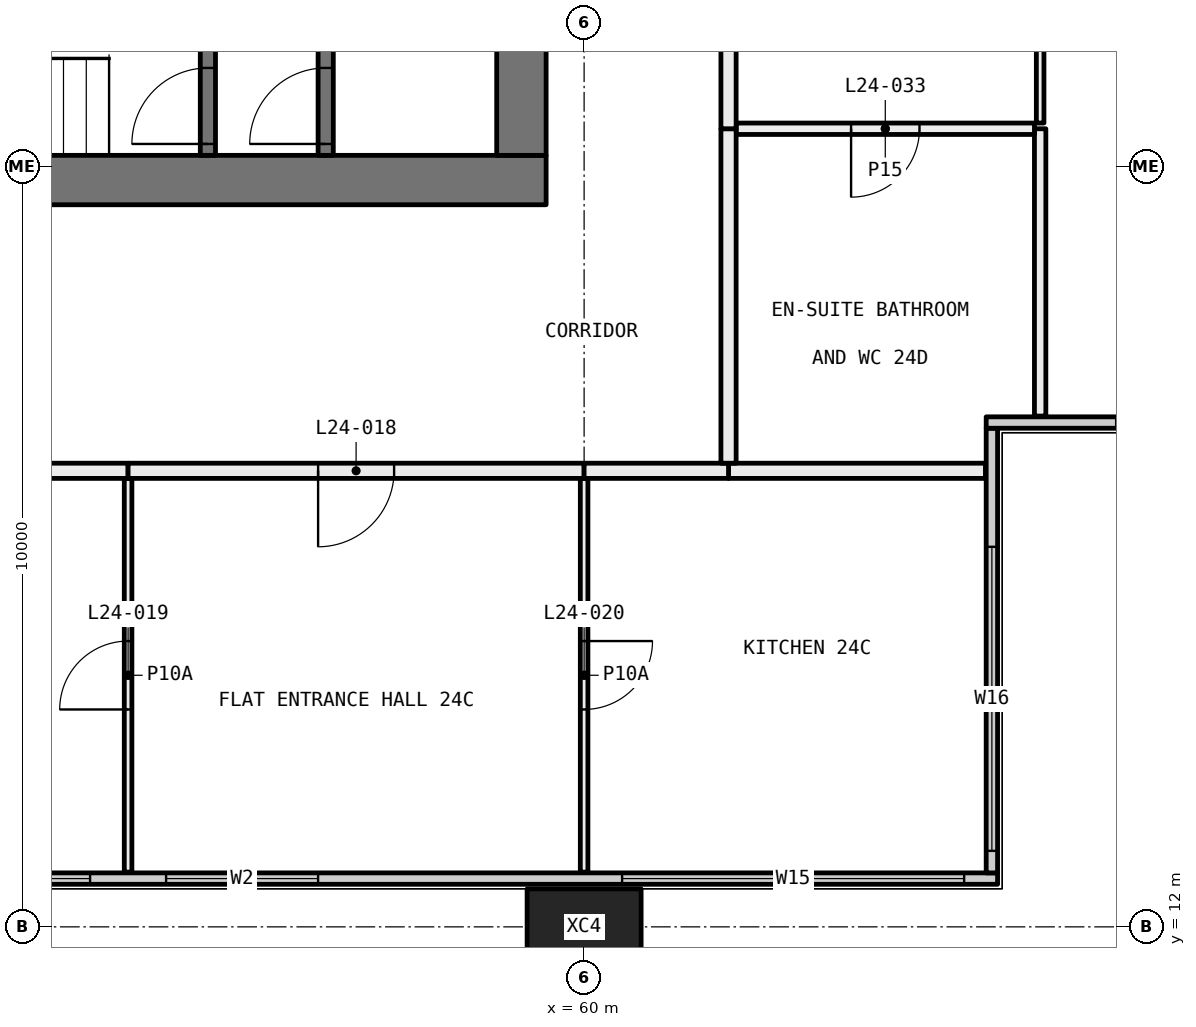
"""IFC4 building model, lengths in metres.
Left out: names, types, materials, properties, quantities, classifications, styles, units other than length and angle.
Written with IfcOpenShell. Run it as: python <this file> out.ifc"""

import sys

from ifc_helpers import new_model, si_unit, direction, frame, frame_2d, origin, origin_2d, place, context, subcontext, project, spatial, rectangle, hollow_rectangle, extrude, element, fill, save


model = new_model("IFC4")
c1 = context("Model", 3, precision=1e-05, world=origin(), true_north=direction((0.0, 1.0)))
c2 = subcontext(c1, "Body", "Model", "MODEL_VIEW")
j1 = project(units=[si_unit("LENGTHUNIT", "METRE"), si_unit("PLANEANGLEUNIT", "RADIAN")], contexts=[c1])
p1 = place(None, origin())
s1 = spatial("IfcSite", under=j1, at=p1, CompositionType="ELEMENT")
p2 = place(p1, origin())
s2 = spatial("IfcBuilding", under=s1, at=p2, CompositionType="ELEMENT")
p3 = place(p2, frame((0.0, 0.0, 96.6)))
s3 = spatial("IfcBuildingStorey", under=s2, at=p3, CompositionType="ELEMENT", Elevation=96.6)
p4 = place(p3, frame((60.0, 12.0, -0.4), z_axis=(0.0, 0.0, 1.0), x_axis=(1.0, 0.0, 0.0)))
e1 = element("IfcColumn", 1, at=p4, inside=s3, PredefinedType="COLUMN", context=c2, shape_type="SweptSolid", body=[
    extrude(hollow_rectangle(XDim=1.5, YDim=1.0, WallThickness=0.06, at=origin_2d()), origin(), (0.0, 0.0, 1.0), 3.45),
])
p5 = place(p3, frame((6.56, 12.635, 0.0), z_axis=(0.0, 0.0, 1.0), x_axis=(1.0, 0.0, 0.0)))
e2 = element("IfcWall", 2, at=p5, inside=s3, PredefinedType="ELEMENTEDWALL", context=c2, shape_type="SweptSolid", body=[
    extrude(rectangle(XDim=58.88, YDim=0.15, at=frame_2d((29.44, 0.0))), origin(), (0.0, 0.0, 1.0), 3.05),
])
p6 = place(p5, frame((0.44, 0.0, 0.45)))
e3 = element("IfcOpeningElement", 3, at=p6, cuts=e2, PredefinedType="OPENING", context=c2, shape_type="SweptSolid", body=[
    extrude(rectangle(XDim=4.5, YDim=2.55, at=frame_2d((2.25, 1.275))), frame((0.0, 0.085, 0.0), z_axis=(0.0, -1.0, 0.0), x_axis=(1.0, 0.0, 0.0)), (0.0, 0.0, 1.0), 0.17),
])
p7 = place(p5, frame((8.19, 0.0, 0.45)))
e4 = element("IfcOpeningElement", 4, at=p7, cuts=e2, PredefinedType="OPENING", context=c2, shape_type="SweptSolid", body=[
    extrude(rectangle(XDim=2.75, YDim=2.55, at=frame_2d((1.375, 1.275))), frame((0.0, 0.085, 0.0), z_axis=(0.0, -1.0, 0.0), x_axis=(1.0, 0.0, 0.0)), (0.0, 0.0, 1.0), 0.17),
])
p8 = place(p5, frame((11.94, 0.0, 0.45)))
e5 = element("IfcOpeningElement", 5, at=p8, cuts=e2, PredefinedType="OPENING", context=c2, shape_type="SweptSolid", body=[
    extrude(rectangle(XDim=2.75, YDim=2.55, at=frame_2d((1.375, 1.275))), frame((0.0, 0.085, 0.0), z_axis=(0.0, -1.0, 0.0), x_axis=(1.0, 0.0, 0.0)), (0.0, 0.0, 1.0), 0.17),
])
p9 = place(p5, frame((20.19, 0.0, 0.45)))
e6 = element("IfcOpeningElement", 6, at=p9, cuts=e2, PredefinedType="OPENING", context=c2, shape_type="SweptSolid", body=[
    extrude(rectangle(XDim=2.75, YDim=2.55, at=frame_2d((1.375, 1.275))), frame((0.0, 0.085, 0.0), z_axis=(0.0, -1.0, 0.0), x_axis=(1.0, 0.0, 0.0)), (0.0, 0.0, 1.0), 0.17),
])
p10 = place(p5, frame((23.94, 0.0, 0.45)))
e7 = element("IfcOpeningElement", 7, at=p10, cuts=e2, PredefinedType="OPENING", context=c2, shape_type="SweptSolid", body=[
    extrude(rectangle(XDim=2.0, YDim=2.55, at=frame_2d((1.0, 1.275))), frame((0.0, 0.085, 0.0), z_axis=(0.0, -1.0, 0.0), x_axis=(1.0, 0.0, 0.0)), (0.0, 0.0, 1.0), 0.17),
])
p11 = place(p5, frame((32.19, 0.0, 0.45)))
e8 = element("IfcOpeningElement", 8, at=p11, cuts=e2, PredefinedType="OPENING", context=c2, shape_type="SweptSolid", body=[
    extrude(rectangle(XDim=2.75, YDim=2.55, at=frame_2d((1.375, 1.275))), frame((0.0, 0.085, 0.0), z_axis=(0.0, -1.0, 0.0), x_axis=(1.0, 0.0, 0.0)), (0.0, 0.0, 1.0), 0.17),
])
p12 = place(p5, frame((35.94, 0.0, 0.45)))
e9 = element("IfcOpeningElement", 9, at=p12, cuts=e2, PredefinedType="OPENING", context=c2, shape_type="SweptSolid", body=[
    extrude(rectangle(XDim=2.75, YDim=2.55, at=frame_2d((1.375, 1.275))), frame((0.0, 0.085, 0.0), z_axis=(0.0, -1.0, 0.0), x_axis=(1.0, 0.0, 0.0)), (0.0, 0.0, 1.0), 0.17),
])
p13 = place(p5, frame((44.19, 0.0, 0.45)))
e10 = element("IfcOpeningElement", 10, at=p13, cuts=e2, PredefinedType="OPENING", context=c2, shape_type="SweptSolid", body=[
    extrude(rectangle(XDim=2.75, YDim=2.55, at=frame_2d((1.375, 1.275))), frame((0.0, 0.085, 0.0), z_axis=(0.0, -1.0, 0.0), x_axis=(1.0, 0.0, 0.0)), (0.0, 0.0, 1.0), 0.17),
])
p14 = place(p5, frame((47.94, 0.0, 0.45)))
e11 = element("IfcOpeningElement", 11, at=p14, cuts=e2, PredefinedType="OPENING", context=c2, shape_type="SweptSolid", body=[
    extrude(rectangle(XDim=2.0, YDim=2.55, at=frame_2d((1.0, 1.275))), frame((0.0, 0.085, 0.0), z_axis=(0.0, -1.0, 0.0), x_axis=(1.0, 0.0, 0.0)), (0.0, 0.0, 1.0), 0.17),
])
p15 = place(p5, frame((53.94, 0.0, 0.45)))
e12 = element("IfcOpeningElement", 12, at=p15, cuts=e2, PredefinedType="OPENING", context=c2, shape_type="SweptSolid", body=[
    extrude(rectangle(XDim=4.5, YDim=2.55, at=frame_2d((2.25, 1.275))), frame((0.0, 0.085, 0.0), z_axis=(0.0, -1.0, 0.0), x_axis=(1.0, 0.0, 0.0)), (0.0, 0.0, 1.0), 0.17),
])
p16 = place(p3, frame((65.365, 12.71, 0.0), z_axis=(0.0, 0.0, 1.0), x_axis=(0.0, 1.0, 0.0)))
e13 = element("IfcWall", 13, at=p16, inside=s3, PredefinedType="ELEMENTEDWALL", context=c2, shape_type="SweptSolid", body=[
    extrude(rectangle(XDim=5.85, YDim=0.15, at=frame_2d((2.925, 0.0))), origin(), (0.0, 0.0, 1.0), 3.05),
])
p17 = place(p16, frame((0.29, 0.0, 0.45)))
e14 = element("IfcOpeningElement", 14, at=p17, cuts=e13, PredefinedType="OPENING", context=c2, shape_type="SweptSolid", body=[
    extrude(rectangle(XDim=4.0, YDim=2.55, at=frame_2d((2.0, 1.275))), frame((0.0, 0.085, 0.0), z_axis=(0.0, -1.0, 0.0), x_axis=(1.0, 0.0, 0.0)), (0.0, 0.0, 1.0), 0.17),
])
p18 = place(p3, frame((65.29, 18.635, 0.0), z_axis=(0.0, 0.0, 1.0), x_axis=(1.0, 0.0, 0.0)))
e15 = element("IfcWall", 15, at=p18, inside=s3, PredefinedType="ELEMENTEDWALL", context=c2, shape_type="SweptSolid", body=[
    extrude(rectangle(XDim=6.15, YDim=0.15, at=frame_2d((3.075, 0.0))), origin(), (0.0, 0.0, 1.0), 3.05),
])
p19 = place(p18, frame((1.71, 0.0, 0.45)))
e16 = element("IfcOpeningElement", 16, at=p19, cuts=e15, PredefinedType="OPENING", context=c2, shape_type="SweptSolid", body=[
    extrude(rectangle(XDim=4.0, YDim=2.55, at=frame_2d((2.0, 1.275))), frame((0.0, 0.085, 0.0), z_axis=(0.0, -1.0, 0.0), x_axis=(1.0, 0.0, 0.0)), (0.0, 0.0, 1.0), 0.17),
])
p20 = place(p3, frame((54.0, 12.72, 0.0), z_axis=(0.0, 0.0, 1.0), x_axis=(0.0, 1.0, 0.0)))
e17 = element("IfcWall", 17, at=p20, inside=s3, PredefinedType="PARTITIONING", context=c2, shape_type="SweptSolid", body=[
    extrude(rectangle(XDim=5.18, YDim=0.1, at=frame_2d((2.59, 0.0))), origin(), (0.0, 0.0, 1.0), 3.05),
])
p21 = place(p20, frame((2.14, 0.0, 0.0)))
e18 = element("IfcOpeningElement", 18, at=p21, cuts=e17, PredefinedType="OPENING", context=c2, shape_type="SweptSolid", body=[
    extrude(rectangle(XDim=0.9, YDim=2.1, at=frame_2d((0.45, 1.05))), frame((0.0, 0.06, 0.0), z_axis=(0.0, -1.0, 0.0), x_axis=(1.0, 0.0, 0.0)), (0.0, 0.0, 1.0), 0.12),
])
p22 = place(p3, frame((54.0, 18.0, 0.0), z_axis=(0.0, 0.0, 1.0), x_axis=(-1.0, 0.0, 0.0)))
e19 = element("IfcWall", 19, at=p22, inside=s3, PredefinedType="PARTITIONING", context=c2, shape_type="SweptSolid", body=[
    extrude(rectangle(XDim=7.9, YDim=0.2, at=frame_2d((3.95, 0.0))), origin(), (0.0, 0.0, 1.0), 3.05),
])
p23 = place(p3, frame((60.0, 12.72, 0.0), z_axis=(0.0, 0.0, 1.0), x_axis=(0.0, 1.0, 0.0)))
e20 = element("IfcWall", 20, at=p23, inside=s3, PredefinedType="PARTITIONING", context=c2, shape_type="SweptSolid", body=[
    extrude(rectangle(XDim=5.18, YDim=0.1, at=frame_2d((2.59, 0.0))), origin(), (0.0, 0.0, 1.0), 3.05),
])
p24 = place(p23, frame((2.14, 0.0, 0.0)))
e21 = element("IfcOpeningElement", 21, at=p24, cuts=e20, PredefinedType="OPENING", context=c2, shape_type="SweptSolid", body=[
    extrude(rectangle(XDim=0.9, YDim=2.1, at=frame_2d((0.45, 1.05))), frame((0.0, 0.06, 0.0), z_axis=(0.0, -1.0, 0.0), x_axis=(1.0, 0.0, 0.0)), (0.0, 0.0, 1.0), 0.12),
])
p25 = place(p3, frame((60.0, 18.0, 0.0), z_axis=(0.0, 0.0, 1.0), x_axis=(-1.0, 0.0, 0.0)))
e22 = element("IfcWall", 22, at=p25, inside=s3, PredefinedType="PARTITIONING", context=c2, shape_type="SweptSolid", body=[
    extrude(rectangle(XDim=6.0, YDim=0.2, at=frame_2d((3.0, 0.0))), origin(), (0.0, 0.0, 1.0), 3.05),
])
p26 = place(p25, frame((2.5, 0.0, 0.0)))
e23 = element("IfcOpeningElement", 23, at=p26, cuts=e22, PredefinedType="OPENING", context=c2, shape_type="SweptSolid", body=[
    extrude(rectangle(XDim=1.0, YDim=2.1, at=frame_2d((0.5, 1.05))), frame((0.0, 0.11, 0.0), z_axis=(0.0, -1.0, 0.0), x_axis=(1.0, 0.0, 0.0)), (0.0, 0.0, 1.0), 0.22),
])
p27 = place(p3, frame((65.28, 18.0, 0.0), z_axis=(0.0, 0.0, 1.0), x_axis=(-1.0, 0.0, 0.0)))
e24 = element("IfcWall", 24, at=p27, inside=s3, PredefinedType="PARTITIONING", context=c2, shape_type="SweptSolid", body=[
    extrude(rectangle(XDim=3.38, YDim=0.2, at=frame_2d((1.69, 0.0))), origin(), (0.0, 0.0, 1.0), 3.05),
])
p28 = place(p3, frame((61.9, 18.0, 0.0), z_axis=(0.0, 0.0, 1.0), x_axis=(-1.0, 0.0, 0.0)))
e25 = element("IfcWall", 25, at=p28, inside=s3, PredefinedType="PARTITIONING", context=c2, shape_type="SweptSolid", body=[
    extrude(rectangle(XDim=1.9, YDim=0.2, at=frame_2d((0.95, 0.0))), origin(), (0.0, 0.0, 1.0), 3.05),
])
p29 = place(p3, frame((66.0, 22.5, 0.0), z_axis=(0.0, 0.0, 1.0), x_axis=(0.0, -1.0, 0.0)))
e26 = element("IfcWall", 26, at=p29, inside=s3, PredefinedType="PARTITIONING", context=c2, shape_type="SweptSolid", body=[
    extrude(rectangle(XDim=3.78, YDim=0.15, at=frame_2d((1.89, 0.0))), origin(), (0.0, 0.0, 1.0), 3.05),
])
p30 = place(p3, frame((66.0, 23.9, 0.0), z_axis=(0.0, 0.0, 1.0), x_axis=(0.0, -1.0, 0.0)))
e27 = element("IfcWall", 27, at=p30, inside=s3, PredefinedType="PARTITIONING", context=c2, shape_type="SweptSolid", body=[
    extrude(rectangle(XDim=1.325, YDim=0.1, at=frame_2d((0.663, 0.0))), origin(), (0.0, 0.0, 1.0), 3.05),
])
p31 = place(p3, frame((65.925, 22.5, 0.0), z_axis=(0.0, 0.0, 1.0), x_axis=(-1.0, 0.0, 0.0)))
e28 = element("IfcWall", 28, at=p31, inside=s3, PredefinedType="PARTITIONING", context=c2, shape_type="SweptSolid", body=[
    extrude(rectangle(XDim=3.925, YDim=0.15, at=frame_2d((1.962, 0.0))), origin(), (0.0, 0.0, 1.0), 3.05),
])
p32 = place(p31, frame((1.512, 0.0, 0.0)))
e29 = element("IfcOpeningElement", 29, at=p32, cuts=e28, PredefinedType="OPENING", context=c2, shape_type="SweptSolid", body=[
    extrude(rectangle(XDim=0.9, YDim=2.1, at=frame_2d((0.45, 1.05))), frame((0.0, 0.085, 0.0), z_axis=(0.0, -1.0, 0.0), x_axis=(1.0, 0.0, 0.0)), (0.0, 0.0, 1.0), 0.17),
])
p33 = place(p3, frame((61.9, 22.5, 0.0), z_axis=(0.0, 0.0, 1.0), x_axis=(0.0, -1.0, 0.0)))
e30 = element("IfcWall", 30, at=p33, inside=s3, PredefinedType="PARTITIONING", context=c2, shape_type="SweptSolid", body=[
    extrude(rectangle(XDim=4.4, YDim=0.2, at=frame_2d((2.2, 0.0))), origin(), (0.0, 0.0, 1.0), 3.05),
])
p34 = place(p3, frame((61.9, 23.9, 0.0), z_axis=(0.0, 0.0, 1.0), x_axis=(0.0, -1.0, 0.0)))
e31 = element("IfcWall", 31, at=p34, inside=s3, PredefinedType="PARTITIONING", context=c2, shape_type="SweptSolid", body=[
    extrude(rectangle(XDim=1.4, YDim=0.2, at=frame_2d((0.7, 0.0))), origin(), (0.0, 0.0, 1.0), 3.05),
])
p35 = place(p3, frame((59.5, 21.825, 0.0), z_axis=(0.0, 0.0, 1.0), x_axis=(-1.0, 0.0, 0.0)))
e32 = element("IfcWall", 32, at=p35, inside=s3, PredefinedType="SHEAR", context=c2, shape_type="SweptSolid", body=[
    extrude(rectangle(XDim=11.0, YDim=0.65, at=frame_2d((5.5, 0.0))), origin(), (0.0, 0.0, 1.0), 3.05),
])
p36 = place(p3, frame((59.175, 22.15, 0.0), z_axis=(0.0, 0.0, 1.0), x_axis=(0.0, 1.0, 0.0)))
e33 = element("IfcWall", 33, at=p36, inside=s3, PredefinedType="SHEAR", context=c2, shape_type="SweptSolid", body=[
    extrude(rectangle(XDim=15.7, YDim=0.65, at=frame_2d((7.85, 0.0))), origin(), (0.0, 0.0, 1.0), 3.05),
])
p37 = place(p36, frame((8.3, 0.0, 0.0)))
e34 = element("IfcOpeningElement", 34, at=p37, cuts=e33, PredefinedType="OPENING", context=c2, shape_type="SweptSolid", body=[
    extrude(rectangle(XDim=1.6, YDim=2.1, at=frame_2d((0.8, 1.05))), frame((0.0, 0.335, 0.0), z_axis=(0.0, -1.0, 0.0), x_axis=(1.0, 0.0, 0.0)), (0.0, 0.0, 1.0), 0.67),
])
p38 = place(p36, frame((2.125, 0.0, 0.0)))
e35 = element("IfcOpeningElement", 35, at=p38, cuts=e33, PredefinedType="OPENING", context=c2, shape_type="SweptSolid", body=[
    extrude(rectangle(XDim=1.0, YDim=2.1, at=frame_2d((0.5, 1.05))), frame((0.0, 0.335, 0.0), z_axis=(0.0, -1.0, 0.0), x_axis=(1.0, 0.0, 0.0)), (0.0, 0.0, 1.0), 0.67),
])
p39 = place(p3, frame((56.6, 22.15, 0.0), z_axis=(0.0, 0.0, 1.0), x_axis=(0.0, 1.0, 0.0)))
e36 = element("IfcWall", 36, at=p39, inside=s3, PredefinedType="SOLIDWALL", context=c2, shape_type="SweptSolid", body=[
    extrude(rectangle(XDim=12.75, YDim=0.2, at=frame_2d((6.375, 0.0))), origin(), (0.0, 0.0, 1.0), 3.05),
])
p40 = place(p39, frame((3.55, 0.0, 0.0)))
e37 = element("IfcOpeningElement", 37, at=p40, cuts=e36, PredefinedType="OPENING", context=c2, shape_type="SweptSolid", body=[
    extrude(rectangle(XDim=1.1, YDim=2.1, at=frame_2d((0.55, 1.05))), frame((0.0, 0.11, 0.0), z_axis=(0.0, -1.0, 0.0), x_axis=(1.0, 0.0, 0.0)), (0.0, 0.0, 1.0), 0.22),
])
p41 = place(p39, frame((6.05, 0.0, 0.0)))
e38 = element("IfcOpeningElement", 38, at=p41, cuts=e36, PredefinedType="OPENING", context=c2, shape_type="SweptSolid", body=[
    extrude(rectangle(XDim=1.1, YDim=2.1, at=frame_2d((0.55, 1.05))), frame((0.0, 0.11, 0.0), z_axis=(0.0, -1.0, 0.0), x_axis=(1.0, 0.0, 0.0)), (0.0, 0.0, 1.0), 0.22),
])
p42 = place(p39, frame((8.55, 0.0, 0.0)))
e39 = element("IfcOpeningElement", 39, at=p42, cuts=e36, PredefinedType="OPENING", context=c2, shape_type="SweptSolid", body=[
    extrude(rectangle(XDim=1.1, YDim=2.1, at=frame_2d((0.55, 1.05))), frame((0.0, 0.11, 0.0), z_axis=(0.0, -1.0, 0.0), x_axis=(1.0, 0.0, 0.0)), (0.0, 0.0, 1.0), 0.22),
])
p43 = place(p39, frame((11.05, 0.0, 0.0)))
e40 = element("IfcOpeningElement", 40, at=p43, cuts=e36, PredefinedType="OPENING", context=c2, shape_type="SweptSolid", body=[
    extrude(rectangle(XDim=1.1, YDim=2.1, at=frame_2d((0.55, 1.05))), frame((0.0, 0.11, 0.0), z_axis=(0.0, -1.0, 0.0), x_axis=(1.0, 0.0, 0.0)), (0.0, 0.0, 1.0), 0.22),
])
p44 = place(p39, frame((0.15, 0.0, 0.0)))
e41 = element("IfcOpeningElement", 41, at=p44, cuts=e36, PredefinedType="OPENING", context=c2, shape_type="SweptSolid", body=[
    extrude(rectangle(XDim=1.0, YDim=2.1, at=frame_2d((0.5, 1.05))), frame((0.0, 0.11, 0.0), z_axis=(0.0, -1.0, 0.0), x_axis=(1.0, 0.0, 0.0)), (0.0, 0.0, 1.0), 0.22),
])
p45 = place(p3, frame((55.05, 22.15, 0.0), z_axis=(0.0, 0.0, 1.0), x_axis=(0.0, 1.0, 0.0)))
e42 = element("IfcWall", 42, at=p45, inside=s3, PredefinedType="SOLIDWALL", context=c2, shape_type="SweptSolid", body=[
    extrude(rectangle(XDim=2.75, YDim=0.2, at=frame_2d((1.375, 0.0))), origin(), (0.0, 0.0, 1.0), 3.05),
])
p46 = place(p45, frame((0.15, 0.0, 0.0)))
e43 = element("IfcOpeningElement", 43, at=p46, cuts=e42, PredefinedType="OPENING", context=c2, shape_type="SweptSolid", body=[
    extrude(rectangle(XDim=1.0, YDim=2.1, at=frame_2d((0.5, 1.05))), frame((0.0, 0.11, 0.0), z_axis=(0.0, -1.0, 0.0), x_axis=(1.0, 0.0, 0.0)), (0.0, 0.0, 1.0), 0.22),
])
p47 = place(p13, origin())
e44 = element("IfcWindow", 44, at=p47, inside=s3, PartitioningType="SINGLE_PANEL", PredefinedType="WINDOW", context=c2, shape_type="SweptSolid", body=[
    extrude(rectangle(XDim=2.75, YDim=2.55, at=frame_2d((1.375, 1.275))), frame((0.0, 0.03, 0.0), z_axis=(0.0, -1.0, 0.0), x_axis=(1.0, 0.0, 0.0)), (0.0, 0.0, 1.0), 0.06),
])
fill(e10, e44)
p48 = place(p14, origin())
e45 = element("IfcWindow", 45, at=p48, inside=s3, PartitioningType="SINGLE_PANEL", PredefinedType="WINDOW", context=c2, shape_type="SweptSolid", body=[
    extrude(rectangle(XDim=2.0, YDim=2.55, at=frame_2d((1.0, 1.275))), frame((0.0, 0.03, 0.0), z_axis=(0.0, -1.0, 0.0), x_axis=(1.0, 0.0, 0.0)), (0.0, 0.0, 1.0), 0.06),
])
fill(e11, e45)
p49 = place(p15, origin())
e46 = element("IfcWindow", 46, at=p49, inside=s3, PartitioningType="SINGLE_PANEL", PredefinedType="WINDOW", context=c2, shape_type="SweptSolid", body=[
    extrude(rectangle(XDim=4.5, YDim=2.55, at=frame_2d((2.25, 1.275))), frame((0.0, 0.03, 0.0), z_axis=(0.0, -1.0, 0.0), x_axis=(1.0, 0.0, 0.0)), (0.0, 0.0, 1.0), 0.06),
])
fill(e12, e46)
p50 = place(p17, origin())
e47 = element("IfcWindow", 47, at=p50, inside=s3, PartitioningType="SINGLE_PANEL", PredefinedType="WINDOW", context=c2, shape_type="SweptSolid", body=[
    extrude(rectangle(XDim=4.0, YDim=2.55, at=frame_2d((2.0, 1.275))), frame((0.0, 0.03, 0.0), z_axis=(0.0, -1.0, 0.0), x_axis=(1.0, 0.0, 0.0)), (0.0, 0.0, 1.0), 0.06),
])
fill(e14, e47)
p51 = place(p26, origin())
e48 = element("IfcDoor", 48, at=p51, inside=s3, OperationType="SINGLE_SWING_LEFT", PredefinedType="DOOR", context=c2, shape_type="SweptSolid", body=[
    extrude(rectangle(XDim=1.0, YDim=2.1, at=frame_2d((0.5, 1.05))), frame((0.0, 0.025, 0.0), z_axis=(0.0, -1.0, 0.0), x_axis=(1.0, 0.0, 0.0)), (0.0, 0.0, 1.0), 0.05),
])
fill(e23, e48)
p52 = place(p21, origin())
e49 = element("IfcDoor", 49, at=p52, inside=s3, OperationType="SINGLE_SWING_RIGHT", PredefinedType="DOOR", context=c2, shape_type="SweptSolid", body=[
    extrude(rectangle(XDim=0.9, YDim=2.1, at=frame_2d((0.45, 1.05))), frame((0.0, 0.025, 0.0), z_axis=(0.0, -1.0, 0.0), x_axis=(1.0, 0.0, 0.0)), (0.0, 0.0, 1.0), 0.05),
])
fill(e18, e49)
p53 = place(p24, frame((0.9, 0.0, 0.0), x_axis=(-1.0, 0.0, 0.0)))
e50 = element("IfcDoor", 50, at=p53, inside=s3, OperationType="SINGLE_SWING_RIGHT", PredefinedType="DOOR", context=c2, shape_type="SweptSolid", body=[
    extrude(rectangle(XDim=0.9, YDim=2.1, at=frame_2d((0.45, 1.05))), frame((0.0, 0.025, 0.0), z_axis=(0.0, -1.0, 0.0), x_axis=(1.0, 0.0, 0.0)), (0.0, 0.0, 1.0), 0.05),
])
fill(e21, e50)
p54 = place(p32, origin())
e51 = element("IfcDoor", 51, at=p54, inside=s3, OperationType="SINGLE_SWING_LEFT", PredefinedType="DOOR", context=c2, shape_type="SweptSolid", body=[
    extrude(rectangle(XDim=0.9, YDim=2.1, at=frame_2d((0.45, 1.05))), frame((0.0, 0.025, 0.0), z_axis=(0.0, -1.0, 0.0), x_axis=(1.0, 0.0, 0.0)), (0.0, 0.0, 1.0), 0.05),
])
fill(e29, e51)
p55 = place(p46, origin())
e52 = element("IfcDoor", 52, at=p55, inside=s3, OperationType="SINGLE_SWING_RIGHT", PredefinedType="DOOR", context=c2, shape_type="SweptSolid", body=[
    extrude(rectangle(XDim=1.0, YDim=2.1, at=frame_2d((0.5, 1.05))), frame((0.0, 0.025, 0.0), z_axis=(0.0, -1.0, 0.0), x_axis=(1.0, 0.0, 0.0)), (0.0, 0.0, 1.0), 0.05),
])
fill(e43, e52)
p56 = place(p44, origin())
e53 = element("IfcDoor", 53, at=p56, inside=s3, OperationType="SINGLE_SWING_RIGHT", PredefinedType="DOOR", context=c2, shape_type="SweptSolid", body=[
    extrude(rectangle(XDim=1.0, YDim=2.1, at=frame_2d((0.5, 1.05))), frame((0.0, 0.025, 0.0), z_axis=(0.0, -1.0, 0.0), x_axis=(1.0, 0.0, 0.0)), (0.0, 0.0, 1.0), 0.05),
])
fill(e41, e53)
save(model, sys.argv[1])
